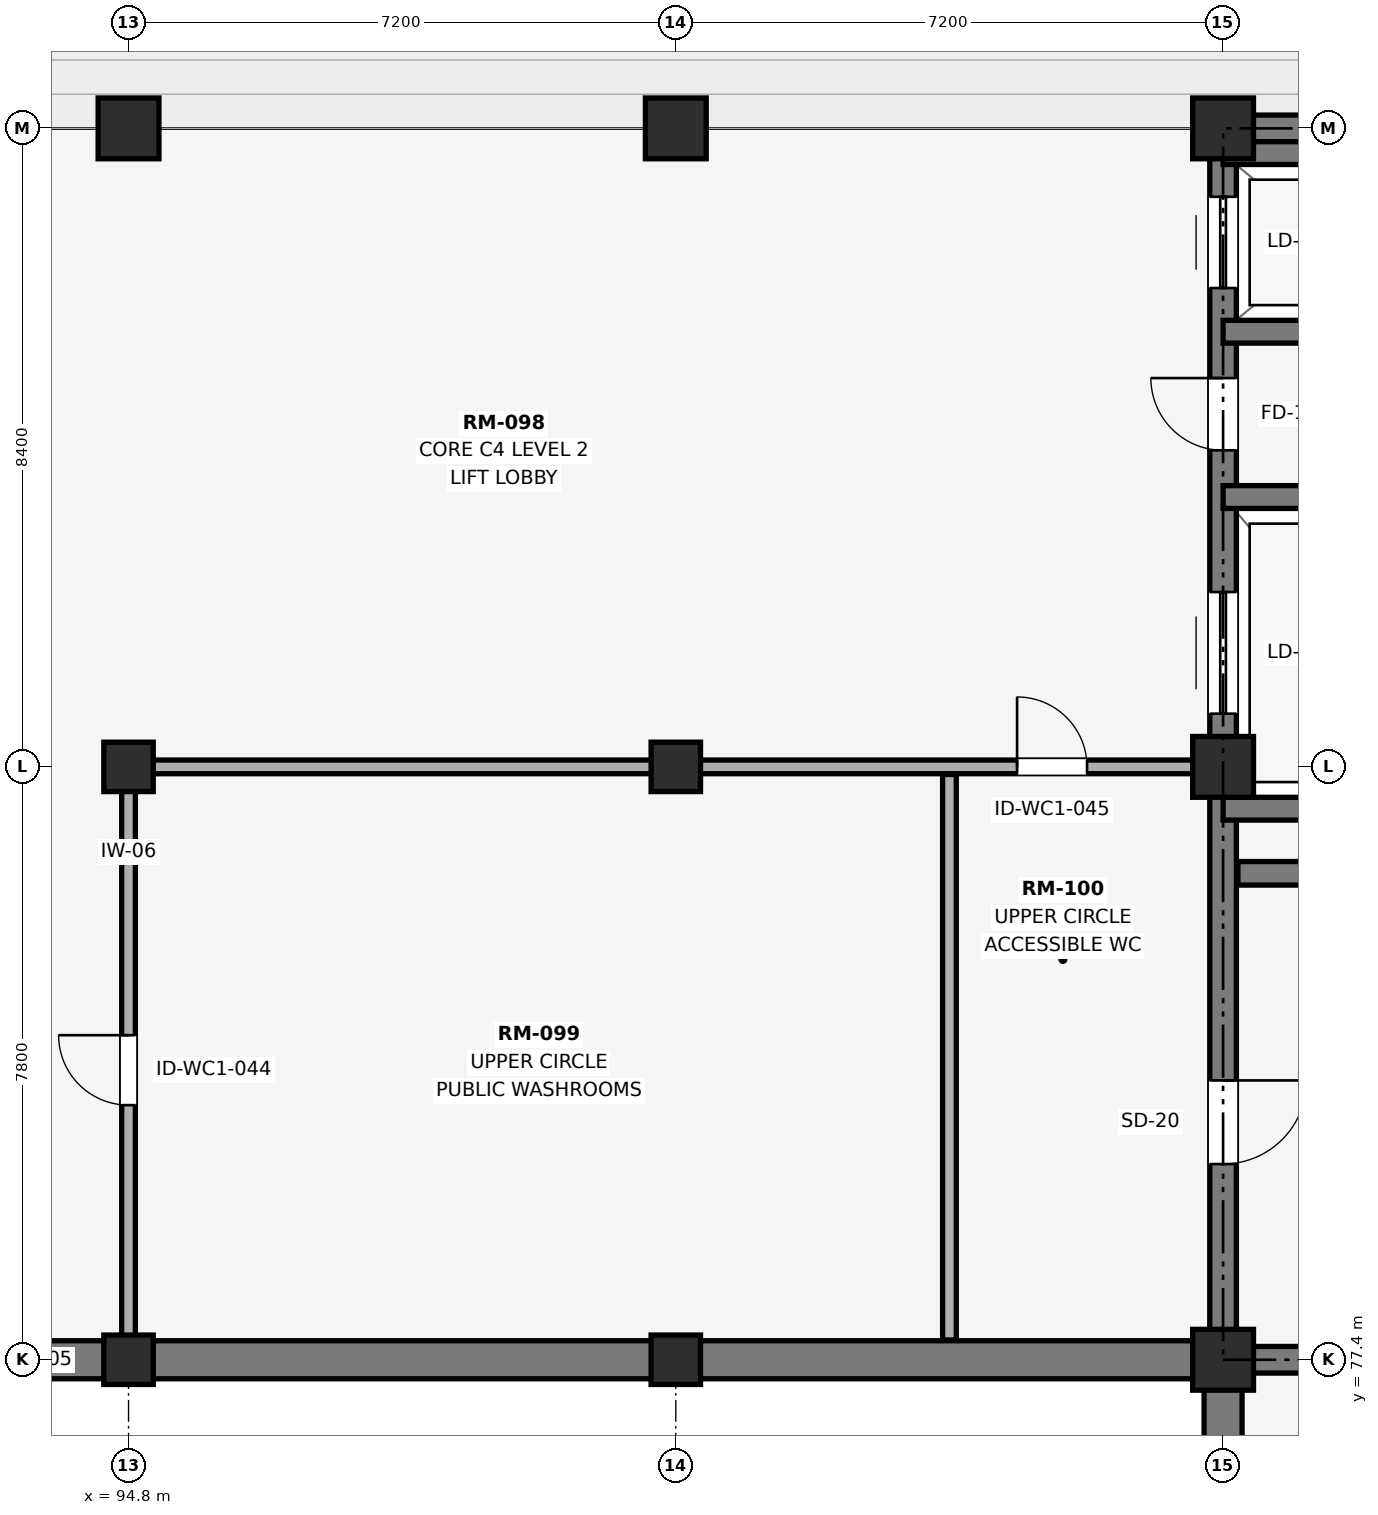
"""IFC4 building model, lengths in metres.
Left out: names, types, materials, properties, quantities, classifications, styles, units other than length and angle.
Written with IfcOpenShell. Run it as: python <this file> out.ifc"""

import sys

from ifc_helpers import new_model, si_unit, direction, frame, frame_2d, origin, origin_2d, place, context, subcontext, project, spatial, rectangle, extrude, element, fill, save


model = new_model("IFC4")
c1 = context("Model", 3, precision=1e-05, world=origin(), true_north=direction((0.0, 1.0)))
c2 = subcontext(c1, "Body", "Model", "MODEL_VIEW")
j1 = project(units=[si_unit("LENGTHUNIT", "METRE"), si_unit("PLANEANGLEUNIT", "RADIAN")], contexts=[c1])
p1 = place(None, origin())
s1 = spatial("IfcSite", under=j1, at=p1, CompositionType="ELEMENT")
p2 = place(p1, origin())
s2 = spatial("IfcBuilding", under=s1, at=p2, CompositionType="ELEMENT")
p3 = place(p2, frame((0.0, 0.0, 10.2)))
s3 = spatial("IfcBuildingStorey", under=s2, at=p3, CompositionType="ELEMENT", Elevation=10.2)
for number, where, z_axis, x_axis in (
    (1, (94.8, 77.4, 0.0), (0.0, 0.0, 1.0), (1.0, 0.0, 0.0)),
    (2, (94.8, 85.2, 0.0), (0.0, 0.0, 1.0), (1.0, 0.0, 0.0)),
):
    element("IfcColumn", number, at=place(p3, frame(where, z_axis=z_axis, x_axis=x_axis)), inside=s3, PredefinedType="COLUMN", context=c2, shape_type="SweptSolid", body=[
        extrude(rectangle(XDim=0.65, YDim=0.65, at=origin_2d()), origin(), (0.0, 0.0, 1.0), 4.8),
    ])
p4 = place(p3, frame((94.8, 93.6, 0.0), z_axis=(0.0, 0.0, 1.0), x_axis=(1.0, 0.0, 0.0)))
e3 = element("IfcColumn", 3, at=p4, inside=s3, PredefinedType="COLUMN", context=c2, shape_type="SweptSolid", body=[
    extrude(rectangle(XDim=0.8, YDim=0.8, at=origin_2d()), origin(), (0.0, 0.0, 1.0), 4.8),
])
for number, where, z_axis, x_axis in (
    (4, (102.0, 77.4, 0.0), (0.0, 0.0, 1.0), (1.0, 0.0, 0.0)),
    (5, (102.0, 85.2, 0.0), (0.0, 0.0, 1.0), (1.0, 0.0, 0.0)),
):
    element("IfcColumn", number, at=place(p3, frame(where, z_axis=z_axis, x_axis=x_axis)), inside=s3, PredefinedType="COLUMN", context=c2, shape_type="SweptSolid", body=[
        extrude(rectangle(XDim=0.65, YDim=0.65, at=origin_2d()), origin(), (0.0, 0.0, 1.0), 4.8),
    ])
for number, where, z_axis, x_axis in (
    (6, (102.0, 93.6, 0.0), (0.0, 0.0, 1.0), (1.0, 0.0, 0.0)),
    (7, (109.2, 77.4, 0.0), (0.0, 0.0, 1.0), (1.0, 0.0, 0.0)),
    (8, (109.2, 85.2, 0.0), (0.0, 0.0, 1.0), (1.0, 0.0, 0.0)),
    (9, (109.2, 93.6, 0.0), (0.0, 0.0, 1.0), (1.0, 0.0, 0.0)),
):
    element("IfcColumn", number, at=place(p3, frame(where, z_axis=z_axis, x_axis=x_axis)), inside=s3, PredefinedType="COLUMN", context=c2, shape_type="SweptSolid", body=[
        extrude(rectangle(XDim=0.8, YDim=0.8, at=origin_2d()), origin(), (0.0, 0.0, 1.0), 4.8),
    ])
p5 = place(p3, frame((58.59, 77.4, 0.0), z_axis=(0.0, 0.0, 1.0), x_axis=(1.0, 0.0, 0.0)))
e10 = element("IfcWall", 10, at=p5, inside=s3, PredefinedType="SOLIDWALL", context=c2, shape_type="SweptSolid", body=[
    extrude(rectangle(XDim=50.82, YDim=0.5, at=frame_2d((25.41, 0.0))), origin(), (0.0, 0.0, 1.0), 4.8),
])
p6 = place(p5, frame((14.95, 0.0, 0.0)))
e11 = element("IfcOpeningElement", 11, at=p6, cuts=e10, PredefinedType="OPENING", context=c2, shape_type="SweptSolid", body=[
    extrude(rectangle(XDim=2.0, YDim=2.45, at=frame_2d((1.0, 1.225))), frame((0.0, 0.26, 0.0), z_axis=(0.0, -1.0, 0.0), x_axis=(1.0, 0.0, 0.0)), (0.0, 0.0, 1.0), 0.52),
])
p7 = place(p3, frame((109.2, 46.41, 0.0), z_axis=(0.0, 0.0, 1.0), x_axis=(0.0, 1.0, 0.0)))
e12 = element("IfcWall", 12, at=p7, inside=s3, PredefinedType="SOLIDWALL", context=c2, shape_type="SweptSolid", body=[
    extrude(rectangle(XDim=30.78, YDim=0.5, at=frame_2d((15.39, 0.0))), origin(), (0.0, 0.0, 1.0), 4.8),
])
p8 = place(p3, frame((109.52, 77.4, 0.0), z_axis=(0.0, 0.0, 1.0), x_axis=(1.0, 0.0, 0.0)))
e13 = element("IfcWall", 13, at=p8, inside=s3, PredefinedType="SHEAR", context=c2, shape_type="SweptSolid", body=[
    extrude(rectangle(XDim=9.455, YDim=0.35, at=frame_2d((4.728, 0.0))), origin(), (0.0, 0.0, 1.0), 4.8),
])
p9 = place(p3, frame((109.025, 93.6, 0.0), z_axis=(0.0, 0.0, 1.0), x_axis=(1.0, 0.0, 0.0)))
e14 = element("IfcWall", 14, at=p9, inside=s3, PredefinedType="SHEAR", context=c2, shape_type="SweptSolid", body=[
    extrude(rectangle(XDim=9.95, YDim=0.35, at=frame_2d((4.975, 0.0))), origin(), (0.0, 0.0, 1.0), 4.8),
])
p10 = place(p3, frame((109.2, 77.575, 0.0), z_axis=(0.0, 0.0, 1.0), x_axis=(0.0, 1.0, 0.0)))
e15 = element("IfcWall", 15, at=p10, inside=s3, PredefinedType="SHEAR", context=c2, shape_type="SweptSolid", body=[
    extrude(rectangle(XDim=15.85, YDim=0.35, at=frame_2d((7.925, 0.0))), origin(), (0.0, 0.0, 1.0), 4.8),
])
p11 = place(p10, frame((8.325, 0.0, 0.0)))
e16 = element("IfcOpeningElement", 16, at=p11, cuts=e15, PredefinedType="OPENING", context=c2, shape_type="SweptSolid", body=[
    extrude(rectangle(XDim=1.6, YDim=2.4, at=frame_2d((0.8, 1.2))), frame((0.0, 0.185, 0.0), z_axis=(0.0, -1.0, 0.0), x_axis=(1.0, 0.0, 0.0)), (0.0, 0.0, 1.0), 0.37),
])
p12 = place(p10, frame((13.925, 0.0, 0.0)))
e17 = element("IfcOpeningElement", 17, at=p12, cuts=e15, PredefinedType="OPENING", context=c2, shape_type="SweptSolid", body=[
    extrude(rectangle(XDim=1.2, YDim=2.2, at=frame_2d((0.6, 1.1))), frame((0.0, 0.185, 0.0), z_axis=(0.0, -1.0, 0.0), x_axis=(1.0, 0.0, 0.0)), (0.0, 0.0, 1.0), 0.37),
])
p13 = place(p10, frame((11.79, 0.0, 0.0)))
e18 = element("IfcOpeningElement", 18, at=p13, cuts=e15, PredefinedType="OPENING", context=c2, shape_type="SweptSolid", body=[
    extrude(rectangle(XDim=0.95, YDim=2.1, at=frame_2d((0.475, 1.05))), frame((0.0, 0.185, 0.0), z_axis=(0.0, -1.0, 0.0), x_axis=(1.0, 0.0, 0.0)), (0.0, 0.0, 1.0), 0.37),
])
p14 = place(p10, frame((2.4, 0.0, 0.0)))
e19 = element("IfcOpeningElement", 19, at=p14, cuts=e15, PredefinedType="OPENING", context=c2, shape_type="SweptSolid", body=[
    extrude(rectangle(XDim=1.1, YDim=2.2, at=frame_2d((0.55, 1.1))), frame((0.0, 0.185, 0.0), z_axis=(0.0, -1.0, 0.0), x_axis=(1.0, 0.0, 0.0)), (0.0, 0.0, 1.0), 0.37),
])
p15 = place(p3, frame((109.395, 83.8, 0.0), z_axis=(0.0, 0.0, 1.0), x_axis=(1.0, 0.0, 0.0)))
e20 = element("IfcWall", 20, at=p15, inside=s3, PredefinedType="SHEAR", context=c2, shape_type="SweptSolid", body=[
    extrude(rectangle(XDim=9.21, YDim=0.31, at=frame_2d((4.605, 0.0))), origin(), (0.0, 0.0, 1.0), 4.8),
])
for number, where, z_axis, x_axis in (
    (21, (109.2, 84.65, 0.0), (0.0, 0.0, 1.0), (1.0, 0.0, 0.0)),
    (22, (109.2, 88.75, 0.0), (0.0, 0.0, 1.0), (1.0, 0.0, 0.0)),
):
    element("IfcWall", number, at=place(p3, frame(where, z_axis=z_axis, x_axis=x_axis)), inside=s3, PredefinedType="SHEAR", context=c2, shape_type="SweptSolid", body=[
        extrude(rectangle(XDim=3.5, YDim=0.3, at=frame_2d((1.75, 0.0))), origin(), (0.0, 0.0, 1.0), 4.8),
    ])
for number, where, z_axis, x_axis in (
    (23, (109.2, 90.925, 0.0), (0.0, 0.0, 1.0), (1.0, 0.0, 0.0)),
    (24, (109.2, 93.275, 0.0), (0.0, 0.0, 1.0), (1.0, 0.0, 0.0)),
):
    element("IfcWall", number, at=place(p3, frame(where, z_axis=z_axis, x_axis=x_axis)), inside=s3, PredefinedType="SHEAR", context=c2, shape_type="SweptSolid", body=[
        extrude(rectangle(XDim=2.8, YDim=0.3, at=frame_2d((1.4, 0.0))), origin(), (0.0, 0.0, 1.0), 4.8),
    ])
p16 = place(p3, frame((94.8, 77.55, 0.0), z_axis=(0.0, 0.0, 1.0), x_axis=(0.0, 1.0, 0.0)))
e25 = element("IfcWall", 25, at=p16, inside=s3, PredefinedType="PARTITIONING", context=c2, shape_type="SweptSolid", body=[
    extrude(rectangle(XDim=7.65, YDim=0.18, at=frame_2d((3.825, 0.0))), origin(), (0.0, 0.0, 1.0), 3.87),
])
p17 = place(p16, frame((3.2, 0.0, 0.0)))
e26 = element("IfcOpeningElement", 26, at=p17, cuts=e25, PredefinedType="OPENING", context=c2, shape_type="SweptSolid", body=[
    extrude(rectangle(XDim=0.92, YDim=2.15, at=frame_2d((0.46, 1.075))), frame((0.0, 0.1, 0.0), z_axis=(0.0, -1.0, 0.0), x_axis=(1.0, 0.0, 0.0)), (0.0, 0.0, 1.0), 0.2),
])
p18 = place(p3, frame((94.89, 85.2, 0.0), z_axis=(0.0, 0.0, 1.0), x_axis=(1.0, 0.0, 0.0)))
e27 = element("IfcWall", 27, at=p18, inside=s3, PredefinedType="PARTITIONING", context=c2, shape_type="SweptSolid", body=[
    extrude(rectangle(XDim=14.13, YDim=0.18, at=frame_2d((7.065, 0.0))), origin(), (0.0, 0.0, 1.0), 3.84),
])
p19 = place(p18, frame((11.6, 0.0, 0.0)))
e28 = element("IfcOpeningElement", 28, at=p19, cuts=e27, PredefinedType="OPENING", context=c2, shape_type="SweptSolid", body=[
    extrude(rectangle(XDim=0.92, YDim=2.15, at=frame_2d((0.46, 1.075))), frame((0.0, 0.1, 0.0), z_axis=(0.0, -1.0, 0.0), x_axis=(1.0, 0.0, 0.0)), (0.0, 0.0, 1.0), 0.2),
])
p20 = place(p3, frame((105.6, 77.66, 0.0), z_axis=(0.0, 0.0, 1.0), x_axis=(0.0, 1.0, 0.0)))
e29 = element("IfcWall", 29, at=p20, inside=s3, PredefinedType="PARTITIONING", context=c2, shape_type="SweptSolid", body=[
    extrude(rectangle(XDim=7.44, YDim=0.18, at=frame_2d((3.72, 0.0))), origin(), (0.0, 0.0, 1.0), 3.955),
])
p21 = place(p11, origin())
e30 = element("IfcDoor", 30, at=p21, inside=s3, OperationType="SLIDING_TO_RIGHT", PredefinedType="DOOR", context=c2, shape_type="SweptSolid", body=[
    extrude(rectangle(XDim=1.6, YDim=2.4, at=frame_2d((0.8, 1.2))), frame((0.0, 0.025, 0.0), z_axis=(0.0, -1.0, 0.0), x_axis=(1.0, 0.0, 0.0)), (0.0, 0.0, 1.0), 0.05),
])
fill(e16, e30)
p22 = place(p12, origin())
e31 = element("IfcDoor", 31, at=p22, inside=s3, OperationType="SLIDING_TO_LEFT", PredefinedType="DOOR", context=c2, shape_type="SweptSolid", body=[
    extrude(rectangle(XDim=1.2, YDim=2.2, at=frame_2d((0.6, 1.1))), frame((0.0, 0.025, 0.0), z_axis=(0.0, -1.0, 0.0), x_axis=(1.0, 0.0, 0.0)), (0.0, 0.0, 1.0), 0.05),
])
fill(e17, e31)
p23 = place(p13, origin())
e32 = element("IfcDoor", 32, at=p23, inside=s3, OperationType="SINGLE_SWING_RIGHT", PredefinedType="DOOR", context=c2, shape_type="SweptSolid", body=[
    extrude(rectangle(XDim=0.95, YDim=2.1, at=frame_2d((0.475, 1.05))), frame((0.0, 0.025, 0.0), z_axis=(0.0, -1.0, 0.0), x_axis=(1.0, 0.0, 0.0)), (0.0, 0.0, 1.0), 0.05),
])
fill(e18, e32)
p24 = place(p14, frame((1.1, 0.0, 0.0), z_axis=(0.0, 0.0, 1.0), x_axis=(-1.0, 0.0, 0.0)))
e33 = element("IfcDoor", 33, at=p24, inside=s3, OperationType="SINGLE_SWING_RIGHT", PredefinedType="DOOR", context=c2, shape_type="SweptSolid", body=[
    extrude(rectangle(XDim=1.1, YDim=2.2, at=frame_2d((0.55, 1.1))), frame((0.0, 0.025, 0.0), z_axis=(0.0, -1.0, 0.0), x_axis=(1.0, 0.0, 0.0)), (0.0, 0.0, 1.0), 0.05),
])
fill(e19, e33)
p25 = place(p17, origin())
e34 = element("IfcDoor", 34, at=p25, inside=s3, OperationType="SINGLE_SWING_RIGHT", PredefinedType="DOOR", context=c2, shape_type="SweptSolid", body=[
    extrude(rectangle(XDim=0.92, YDim=2.15, at=frame_2d((0.46, 1.075))), frame((0.0, 0.025, 0.0), z_axis=(0.0, -1.0, 0.0), x_axis=(1.0, 0.0, 0.0)), (0.0, 0.0, 1.0), 0.05),
])
fill(e26, e34)
p26 = place(p19, origin())
e35 = element("IfcDoor", 35, at=p26, inside=s3, OperationType="SINGLE_SWING_LEFT", PredefinedType="DOOR", context=c2, shape_type="SweptSolid", body=[
    extrude(rectangle(XDim=0.92, YDim=2.15, at=frame_2d((0.46, 1.075))), frame((0.0, 0.025, 0.0), z_axis=(0.0, -1.0, 0.0), x_axis=(1.0, 0.0, 0.0)), (0.0, 0.0, 1.0), 0.05),
])
fill(e28, e35)
save(model, sys.argv[1])
